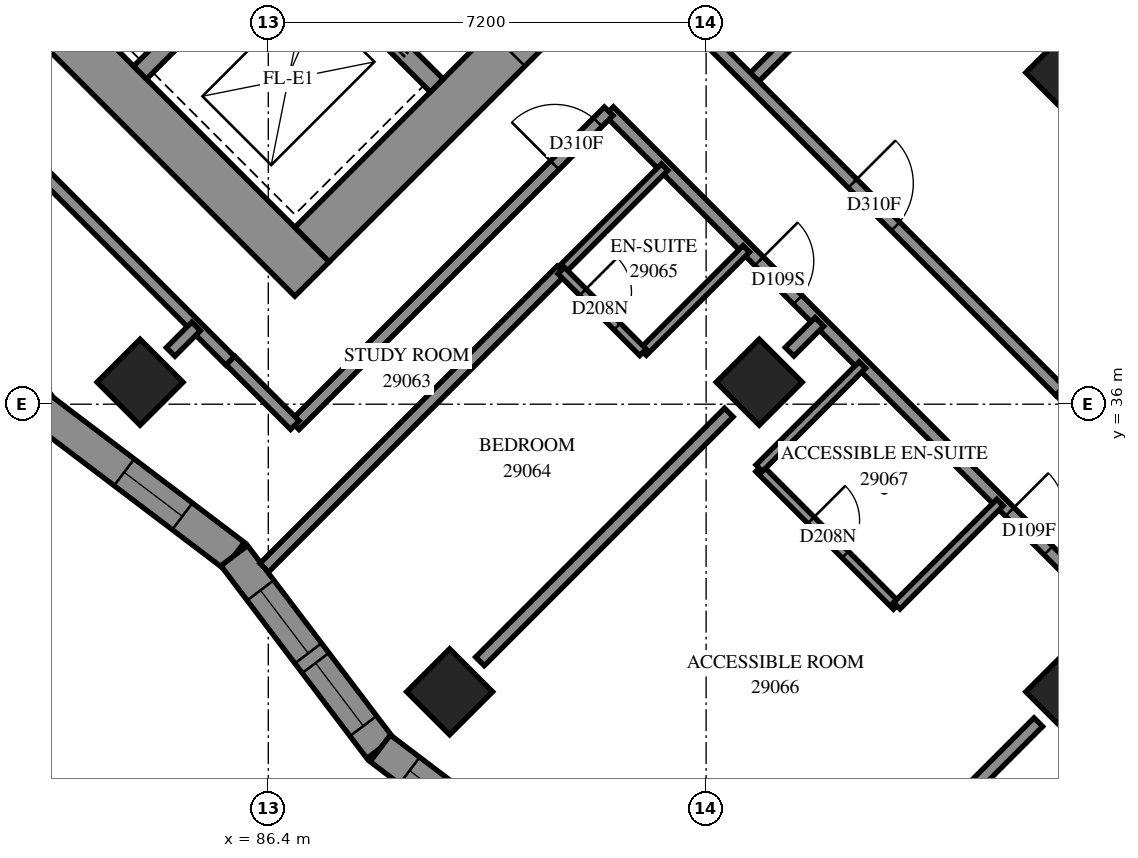
"""IFC4 building model, lengths in metres.
Left out: names, types, materials, properties, quantities, classifications, styles, units other than length and angle.
Written with IfcOpenShell. Run it as: python <this file> out.ifc"""

import sys

from ifc_helpers import new_model, si_unit, direction, frame, frame_2d, origin, origin_2d, place, context, subcontext, project, spatial, polyline, rectangle, outline, extrude, element, fill, save


model = new_model("IFC4")
c1 = context("Model", 3, precision=1e-05, world=origin(), true_north=direction((0.0, 1.0)))
c2 = subcontext(c1, "Body", "Model", "MODEL_VIEW")
j1 = project(units=[si_unit("LENGTHUNIT", "METRE"), si_unit("PLANEANGLEUNIT", "RADIAN")], contexts=[c1])
p1 = place(None, origin())
s1 = spatial("IfcSite", under=j1, at=p1, CompositionType="ELEMENT")
p2 = place(p1, origin())
s2 = spatial("IfcBuilding", under=s1, at=p2, CompositionType="ELEMENT")
p3 = place(p2, frame((0.0, 0.0, 108.4)))
s3 = spatial("IfcBuildingStorey", under=s2, at=p3, CompositionType="ELEMENT", Elevation=108.4)
for number, where, z_axis, x_axis in (
    (1, (84.291, 36.362, 0.0), (0.0, 0.0, 1.0), (0.707, -0.707, 0.0)),
    (2, (99.565, 41.453, 0.0), (0.0, 0.0, 1.0), (0.707, -0.707, 0.0)),
    (3, (94.474, 36.362, 0.0), (0.0, 0.0, 1.0), (0.707, -0.707, 0.0)),
    (4, (89.382, 31.271, 0.0), (0.0, 0.0, 1.0), (0.707, -0.707, 0.0)),
    (5, (99.565, 31.271, 0.0), (0.0, 0.0, 1.0), (0.707, -0.707, 0.0)),
):
    element("IfcColumn", number, at=place(p3, frame(where, z_axis=z_axis, x_axis=x_axis)), inside=s3, PredefinedType="COLUMN", context=c2, shape_type="SweptSolid", body=[
        extrude(rectangle(XDim=1.0, YDim=1.0, at=origin_2d()), origin(), (0.0, 0.0, 1.0), 3.1),
    ])
p4 = place(p3, frame((75.806, 49.373, -0.3), z_axis=(0.0, 0.0, 1.0), x_axis=(0.7071067812, -0.7071067812, 0.0)))
e6 = element("IfcWall", 6, at=p4, inside=s3, PredefinedType="SHEAR", context=c2, shape_type="SweptSolid", body=[
    extrude(rectangle(XDim=16.0, YDim=0.8, at=frame_2d((8.0, 0.0))), origin(), (0.0, 0.0, 1.0), 2.7),
])
p5 = place(p3, frame((87.12, 38.625, -0.3), z_axis=(0.0, 0.0, 1.0), x_axis=(0.7071067812, 0.7071067812, 0.0)))
e7 = element("IfcWall", 7, at=p5, inside=s3, PredefinedType="SHEAR", context=c2, shape_type="SweptSolid", body=[
    extrude(rectangle(XDim=14.4, YDim=0.8, at=frame_2d((7.2, 0.0))), origin(), (0.0, 0.0, 1.0), 2.7),
])
p6 = place(p5, frame((4.55, 0.0, 0.3)))
e8 = element("IfcOpeningElement", 8, at=p6, cuts=e7, PredefinedType="OPENING", context=c2, shape_type="SweptSolid", body=[
    extrude(rectangle(XDim=1.1, YDim=2.1, at=frame_2d((0.55, 1.05))), frame((0.0, 0.41, 0.0), z_axis=(0.0, -1.0, 0.0), x_axis=(1.0, 0.0, 0.0)), (0.0, 0.0, 1.0), 0.82),
])
p7 = place(p5, frame((11.35, 0.0, 0.3)))
e9 = element("IfcOpeningElement", 9, at=p7, cuts=e7, PredefinedType="OPENING", context=c2, shape_type="SweptSolid", body=[
    extrude(rectangle(XDim=1.1, YDim=2.1, at=frame_2d((0.55, 1.05))), frame((0.0, 0.41, 0.0), z_axis=(0.0, -1.0, 0.0), x_axis=(1.0, 0.0, 0.0)), (0.0, 0.0, 1.0), 0.82),
])
p8 = place(p3, frame((84.291, 41.453, 0.0), z_axis=(0.0, 0.0, 1.0), x_axis=(0.7071067812, 0.7071067812, 0.0)))
e10 = element("IfcWall", 10, at=p8, inside=s3, PredefinedType="SOLIDWALL", context=c2, shape_type="SweptSolid", body=[
    extrude(rectangle(XDim=3.3, YDim=0.3, at=frame_2d((1.65, 0.0))), origin(), (0.0, 0.0, 1.0), 3.1),
])
p9 = place(p3, frame((78.988, 51.423, 0.0), z_axis=(0.0, 0.0, 1.0), x_axis=(0.7071067812, -0.7071067812, 0.0)))
e11 = element("IfcWall", 11, at=p9, inside=s3, PredefinedType="SOLIDWALL", context=c2, shape_type="SweptSolid", body=[
    extrude(rectangle(XDim=14.4, YDim=0.3, at=frame_2d((7.2, 0.0))), origin(), (0.0, 0.0, 1.0), 3.1),
])
p10 = place(p9, frame((1.25, 0.0, 0.0)))
e12 = element("IfcOpeningElement", 12, at=p10, cuts=e11, PredefinedType="OPENING", context=c2, shape_type="SweptSolid", body=[
    extrude(rectangle(XDim=1.1, YDim=2.1, at=frame_2d((0.55, 1.05))), frame((0.0, 0.16, 0.0), z_axis=(0.0, -1.0, 0.0), x_axis=(1.0, 0.0, 0.0)), (0.0, 0.0, 1.0), 0.32),
])
p11 = place(p9, frame((4.85, 0.0, 0.0)))
e13 = element("IfcOpeningElement", 13, at=p11, cuts=e11, PredefinedType="OPENING", context=c2, shape_type="SweptSolid", body=[
    extrude(rectangle(XDim=1.1, YDim=2.1, at=frame_2d((0.55, 1.05))), frame((0.0, 0.16, 0.0), z_axis=(0.0, -1.0, 0.0), x_axis=(1.0, 0.0, 0.0)), (0.0, 0.0, 1.0), 0.32),
])
p12 = place(p9, frame((8.45, 0.0, 0.0)))
e14 = element("IfcOpeningElement", 14, at=p12, cuts=e11, PredefinedType="OPENING", context=c2, shape_type="SweptSolid", body=[
    extrude(rectangle(XDim=1.1, YDim=2.1, at=frame_2d((0.55, 1.05))), frame((0.0, 0.16, 0.0), z_axis=(0.0, -1.0, 0.0), x_axis=(1.0, 0.0, 0.0)), (0.0, 0.0, 1.0), 0.32),
])
p13 = place(p9, frame((12.05, 0.0, 0.0)))
e15 = element("IfcOpeningElement", 15, at=p13, cuts=e11, PredefinedType="OPENING", context=c2, shape_type="SweptSolid", body=[
    extrude(rectangle(XDim=1.1, YDim=2.1, at=frame_2d((0.55, 1.05))), frame((0.0, 0.16, 0.0), z_axis=(0.0, -1.0, 0.0), x_axis=(1.0, 0.0, 0.0)), (0.0, 0.0, 1.0), 0.32),
])
p14 = place(p3, frame((80.258, 39.094, 0.0), z_axis=(0.0, 0.0, 1.0), x_axis=(0.6040769252, -0.7969260119, 0.0)))
e16 = element("IfcWall", 16, at=p14, inside=s3, PredefinedType="SOLIDWALL", context=c2, shape_type="SweptSolid", body=[
    extrude(outline(polyline([(0.059, -0.275), (4.033, -0.275), (3.958, 0.275), (-0.059, 0.275), (0.059, -0.275)])), origin(), (0.0, 0.0, 1.0), 3.1),
])
p15 = place(p14, frame((1.876, 0.0, 0.5)))
e17 = element("IfcOpeningElement", 17, at=p15, cuts=e16, PredefinedType="OPENING", context=c2, shape_type="SweptSolid", body=[
    extrude(rectangle(XDim=1.2, YDim=2.45, at=frame_2d((0.6, 1.225))), frame((0.0, 0.285, 0.0), z_axis=(0.0, -1.0, 0.0), x_axis=(1.0, 0.0, 0.0)), (0.0, 0.0, 1.0), 0.57),
])
p16 = place(p3, frame((82.672, 35.91, 0.0), z_axis=(0.0, 0.0, 1.0), x_axis=(0.7969251465, -0.6040780669, 0.0)))
e18 = element("IfcWall", 18, at=p16, inside=s3, PredefinedType="SOLIDWALL", context=c2, shape_type="SweptSolid", body=[
    extrude(outline(polyline([(-0.038, -0.275), (3.937, -0.275), (4.013, 0.275), (0.038, 0.275), (-0.038, -0.275)])), origin(), (0.0, 0.0, 1.0), 3.1),
])
p17 = place(p16, frame((1.704, 0.0, 0.5)))
e19 = element("IfcOpeningElement", 19, at=p17, cuts=e18, PredefinedType="OPENING", context=c2, shape_type="SweptSolid", body=[
    extrude(rectangle(XDim=1.2, YDim=2.45, at=frame_2d((0.6, 1.225))), frame((0.0, 0.285, 0.0), z_axis=(0.0, -1.0, 0.0), x_axis=(1.0, 0.0, 0.0)), (0.0, 0.0, 1.0), 0.57),
])
p18 = place(p3, frame((85.84, 33.509, 0.0), z_axis=(0.0, 0.0, 1.0), x_axis=(0.6040819333, -0.7969222157, 0.0)))
e20 = element("IfcWall", 20, at=p18, inside=s3, PredefinedType="SOLIDWALL", context=c2, shape_type="SweptSolid", body=[
    extrude(outline(polyline([(0.038, -0.275), (4.013, -0.275), (3.937, 0.275), (-0.038, 0.275), (0.038, -0.275)])), origin(), (0.0, 0.0, 1.0), 3.1),
])
p19 = place(p18, frame((0.715, 0.0, 0.5)))
e21 = element("IfcOpeningElement", 21, at=p19, cuts=e20, PredefinedType="OPENING", context=c2, shape_type="SweptSolid", body=[
    extrude(rectangle(XDim=1.3, YDim=2.45, at=frame_2d((0.65, 1.225))), frame((0.0, 0.285, 0.0), z_axis=(0.0, -1.0, 0.0), x_axis=(1.0, 0.0, 0.0)), (0.0, 0.0, 1.0), 0.57),
])
p20 = place(p18, frame((2.215, 0.0, 0.5)))
e22 = element("IfcOpeningElement", 22, at=p20, cuts=e20, PredefinedType="OPENING", context=c2, shape_type="SweptSolid", body=[
    extrude(rectangle(XDim=1.3, YDim=2.45, at=frame_2d((0.65, 1.225))), frame((0.0, 0.285, 0.0), z_axis=(0.0, -1.0, 0.0), x_axis=(1.0, 0.0, 0.0)), (0.0, 0.0, 1.0), 0.57),
])
p21 = place(p3, frame((88.241, 30.341, 0.0), z_axis=(0.0, 0.0, 1.0), x_axis=(0.7969251465, -0.6040780669, 0.0)))
e23 = element("IfcWall", 23, at=p21, inside=s3, PredefinedType="SOLIDWALL", context=c2, shape_type="SweptSolid", body=[
    extrude(outline(polyline([(-0.038, -0.275), (3.937, -0.275), (4.013, 0.275), (0.038, 0.275), (-0.038, -0.275)])), origin(), (0.0, 0.0, 1.0), 3.1),
])
p22 = place(p21, frame((0.606, 0.0, 0.5)))
e24 = element("IfcOpeningElement", 24, at=p22, cuts=e23, PredefinedType="OPENING", context=c2, shape_type="SweptSolid", body=[
    extrude(rectangle(XDim=1.3, YDim=2.45, at=frame_2d((0.65, 1.225))), frame((0.0, 0.285, 0.0), z_axis=(0.0, -1.0, 0.0), x_axis=(1.0, 0.0, 0.0)), (0.0, 0.0, 1.0), 0.57),
])
p23 = place(p21, frame((2.106, 0.0, 0.5)))
e25 = element("IfcOpeningElement", 25, at=p23, cuts=e23, PredefinedType="OPENING", context=c2, shape_type="SweptSolid", body=[
    extrude(rectangle(XDim=1.3, YDim=2.45, at=frame_2d((0.65, 1.225))), frame((0.0, 0.285, 0.0), z_axis=(0.0, -1.0, 0.0), x_axis=(1.0, 0.0, 0.0)), (0.0, 0.0, 1.0), 0.57),
])
p24 = place(p3, frame((92.004, 40.819, 0.0), z_axis=(0.0, 0.0, 1.0), x_axis=(0.7071067812, -0.7071067812, 0.0)))
e26 = element("IfcWall", 26, at=p24, inside=s3, PredefinedType="PARTITIONING", context=c2, shape_type="SweptSolid", body=[
    extrude(rectangle(XDim=19.298, YDim=0.2, at=frame_2d((9.649, 0.0))), origin(), (0.0, 0.0, 1.0), 3.1),
])
p25 = place(p24, frame((3.489, 0.0, 0.0)))
e27 = element("IfcOpeningElement", 27, at=p25, cuts=e26, PredefinedType="OPENING", context=c2, shape_type="SweptSolid", body=[
    extrude(rectangle(XDim=0.9, YDim=2.1, at=frame_2d((0.45, 1.05))), frame((0.0, 0.11, 0.0), z_axis=(0.0, -1.0, 0.0), x_axis=(1.0, 0.0, 0.0)), (0.0, 0.0, 1.0), 0.22),
])
p26 = place(p24, frame((9.319, 0.0, 0.0)))
e28 = element("IfcOpeningElement", 28, at=p26, cuts=e26, PredefinedType="OPENING", context=c2, shape_type="SweptSolid", body=[
    extrude(rectangle(XDim=0.9, YDim=2.1, at=frame_2d((0.45, 1.05))), frame((0.0, 0.11, 0.0), z_axis=(0.0, -1.0, 0.0), x_axis=(1.0, 0.0, 0.0)), (0.0, 0.0, 1.0), 0.22),
])
p27 = place(p24, frame((15.961, 0.0, 0.0)))
e29 = element("IfcOpeningElement", 29, at=p27, cuts=e26, PredefinedType="OPENING", context=c2, shape_type="SweptSolid", body=[
    extrude(rectangle(XDim=0.9, YDim=2.1, at=frame_2d((0.45, 1.05))), frame((0.0, 0.11, 0.0), z_axis=(0.0, -1.0, 0.0), x_axis=(1.0, 0.0, 0.0)), (0.0, 0.0, 1.0), 0.22),
])
p28 = place(p3, frame((99.423, 36.221, 0.0), z_axis=(0.0, 0.0, 1.0), x_axis=(0.7071067812, 0.7071067812, 0.0)))
e30 = element("IfcWall", 30, at=p28, inside=s3, PredefinedType="PARTITIONING", context=c2, shape_type="SweptSolid", body=[
    extrude(rectangle(XDim=12.125, YDim=0.2, at=frame_2d((6.062, 0.0))), origin(), (0.0, 0.0, 1.0), 3.1),
])
p29 = place(p3, frame((94.331, 41.313, 0.0), z_axis=(0.0, 0.0, 1.0), x_axis=(0.7071109253, 0.7071026371, 0.0)))
e31 = element("IfcWall", 31, at=p29, inside=s3, PredefinedType="PARTITIONING", context=c2, shape_type="SweptSolid", body=[
    extrude(rectangle(XDim=12.065, YDim=0.2, at=frame_2d((6.033, 0.0))), origin(), (0.0, 0.0, 1.0), 3.1),
])
p30 = place(p3, frame((93.411, 42.227, 0.0), z_axis=(0.0, 0.0, 1.0), x_axis=(0.7071067812, -0.7071067812, 0.0)))
e32 = element("IfcWall", 32, at=p30, inside=s3, PredefinedType="PARTITIONING", context=c2, shape_type="SweptSolid", body=[
    extrude(rectangle(XDim=8.499, YDim=0.2, at=frame_2d((4.25, 0.0))), origin(), (0.0, 0.0, 1.0), 3.1),
])
p31 = place(p30, frame((3.672, 0.0, 0.0)))
e33 = element("IfcOpeningElement", 33, at=p31, cuts=e32, PredefinedType="OPENING", context=c2, shape_type="SweptSolid", body=[
    extrude(rectangle(XDim=1.0, YDim=2.1, at=frame_2d((0.5, 1.05))), frame((0.0, 0.11, 0.0), z_axis=(0.0, -1.0, 0.0), x_axis=(1.0, 0.0, 0.0)), (0.0, 0.0, 1.0), 0.22),
])
p32 = place(p3, frame((86.835, 35.655, 0.0), z_axis=(0.0, 0.0, 1.0), x_axis=(0.7071067812, 0.7071067812, 0.0)))
e34 = element("IfcWall", 34, at=p32, inside=s3, PredefinedType="PARTITIONING", context=c2, shape_type="SweptSolid", body=[
    extrude(rectangle(XDim=7.3, YDim=0.2, at=frame_2d((3.65, 0.0))), origin(), (0.0, 0.0, 1.0), 3.1),
])
p33 = place(p32, frame((6.046, 0.0, 0.0)))
e35 = element("IfcOpeningElement", 35, at=p33, cuts=e34, PredefinedType="OPENING", context=c2, shape_type="SweptSolid", body=[
    extrude(rectangle(XDim=1.0, YDim=2.1, at=frame_2d((0.5, 1.05))), frame((0.0, 0.11, 0.0), z_axis=(0.0, -1.0, 0.0), x_axis=(1.0, 0.0, 0.0)), (0.0, 0.0, 1.0), 0.22),
])
p34 = place(p3, frame((86.334, 33.312, 0.0), z_axis=(0.0, 0.0, 1.0), x_axis=(0.7069693124, 0.7072442232, 0.0)))
e36 = element("IfcWall", 36, at=p34, inside=s3, PredefinedType="PARTITIONING", context=c2, shape_type="SweptSolid", body=[
    extrude(rectangle(XDim=6.911, YDim=0.2, at=frame_2d((3.456, 0.0))), origin(), (0.0, 0.0, 1.0), 3.1),
])
p35 = place(p3, frame((80.948, 41.536, 0.0), z_axis=(0.0, 0.0, 1.0), x_axis=(0.7071067812, -0.7071067812, 0.0)))
e37 = element("IfcWall", 37, at=p35, inside=s3, PredefinedType="PARTITIONING", context=c2, shape_type="SweptSolid", body=[
    extrude(rectangle(XDim=6.822, YDim=0.2, at=frame_2d((3.411, 0.0))), origin(), (0.0, 0.0, 1.0), 3.1),
])
p36 = place(p3, frame((89.881, 31.771, 0.0), z_axis=(0.0, 0.0, 1.0), x_axis=(0.7071067812, 0.7071067812, 0.0)))
e38 = element("IfcWall", 38, at=p36, inside=s3, PredefinedType="PARTITIONING", context=c2, shape_type="SweptSolid", body=[
    extrude(rectangle(XDim=5.787, YDim=0.2, at=frame_2d((2.893, 0.0))), origin(), (0.0, 0.0, 1.0), 3.1),
])
p37 = place(p3, frame((94.973, 26.681, 0.0), z_axis=(0.0, 0.0, 1.0), x_axis=(0.7071067812, 0.7071067812, 0.0)))
e39 = element("IfcWall", 39, at=p37, inside=s3, PredefinedType="PARTITIONING", context=c2, shape_type="SweptSolid", body=[
    extrude(rectangle(XDim=5.784, YDim=0.2, at=frame_2d((2.892, 0.0))), origin(), (0.0, 0.0, 1.0), 3.1),
])
p38 = place(p3, frame((103.168, 32.47, 0.0), z_axis=(0.0, 0.0, 1.0), x_axis=(-0.7067858967, 0.7074275201, 0.0)))
e40 = element("IfcWall", 40, at=p38, inside=s3, PredefinedType="PARTITIONING", context=c2, shape_type="SweptSolid", body=[
    extrude(rectangle(XDim=5.299, YDim=0.2, at=frame_2d((2.65, 0.0))), origin(), (0.0, 0.0, 1.0), 3.1),
])
p39 = place(p38, frame((2.043, 0.0, 0.0)))
e41 = element("IfcOpeningElement", 41, at=p39, cuts=e40, PredefinedType="OPENING", context=c2, shape_type="SweptSolid", body=[
    extrude(rectangle(XDim=0.9, YDim=2.1, at=frame_2d((0.45, 1.05))), frame((0.0, 0.11, 0.0), z_axis=(0.0, -1.0, 0.0), x_axis=(1.0, 0.0, 0.0)), (0.0, 0.0, 1.0), 0.22),
])
p40 = place(p3, frame((94.471, 34.945, 0.0), z_axis=(0.0, 0.0, 1.0), x_axis=(0.7067942478, -0.7074191764, 0.0)))
e42 = element("IfcWall", 42, at=p40, inside=s3, PredefinedType="PARTITIONING", context=c2, shape_type="SweptSolid", body=[
    extrude(rectangle(XDim=3.2, YDim=0.15, at=frame_2d((1.6, 0.0))), origin(), (0.0, 0.0, 1.0), 3.1),
])
p41 = place(p40, frame((1.206, 0.0, 0.0)))
e43 = element("IfcOpeningElement", 43, at=p41, cuts=e42, PredefinedType="OPENING", context=c2, shape_type="SweptSolid", body=[
    extrude(rectangle(XDim=0.8, YDim=2.1, at=frame_2d((0.4, 1.05))), frame((0.0, 0.085, 0.0), z_axis=(0.0, -1.0, 0.0), x_axis=(1.0, 0.0, 0.0)), (0.0, 0.0, 1.0), 0.17),
])
for number, where, z_axis, x_axis in (
    (44, (92.563, 36.857, 0.0), (0.0, 0.0, 1.0), (0.707, 0.707, 0.0)),
    (45, (91.219, 38.201, 0.0), (0.0, 0.0, 1.0), (0.707, 0.707, 0.0)),
    (46, (96.735, 32.685, 0.0), (0.0, 0.0, 1.0), (0.707, 0.707, 0.0)),
):
    element("IfcWall", number, at=place(p3, frame(where, z_axis=z_axis, x_axis=x_axis)), inside=s3, PredefinedType="PARTITIONING", context=c2, shape_type="SweptSolid", body=[
        extrude(rectangle(XDim=2.401, YDim=0.15, at=frame_2d((1.201, 0.0))), origin(), (0.0, 0.0, 1.0), 3.1),
    ])
p42 = place(p3, frame((94.473, 34.949, 0.0), z_axis=(0.0, 0.0, 1.0), x_axis=(0.7071067812, 0.7071067812, 0.0)))
e47 = element("IfcWall", 47, at=p42, inside=s3, PredefinedType="PARTITIONING", context=c2, shape_type="SweptSolid", body=[
    extrude(rectangle(XDim=2.398, YDim=0.15, at=frame_2d((1.199, 0.0))), origin(), (0.0, 0.0, 1.0), 3.1),
])
p43 = place(p3, frame((91.217, 38.197, 0.0), z_axis=(0.0, 0.0, 1.0), x_axis=(0.7071067812, -0.7071067812, 0.0)))
e48 = element("IfcWall", 48, at=p43, inside=s3, PredefinedType="PARTITIONING", context=c2, shape_type="SweptSolid", body=[
    extrude(rectangle(XDim=1.901, YDim=0.15, at=frame_2d((0.95, 0.0))), origin(), (0.0, 0.0, 1.0), 3.1),
])
p44 = place(p43, frame((0.502, 0.0, 0.0)))
e49 = element("IfcOpeningElement", 49, at=p44, cuts=e48, PredefinedType="OPENING", context=c2, shape_type="SweptSolid", body=[
    extrude(rectangle(XDim=0.8, YDim=2.1, at=frame_2d((0.4, 1.05))), frame((0.0, 0.085, 0.0), z_axis=(0.0, -1.0, 0.0), x_axis=(1.0, 0.0, 0.0)), (0.0, 0.0, 1.0), 0.17),
])
p45 = place(p3, frame((85.778, 36.718, 0.0), z_axis=(0.0, 0.0, 1.0), x_axis=(0.7064400143, -0.70777292, 0.0)))
e50 = element("IfcWall", 50, at=p45, inside=s3, PredefinedType="PARTITIONING", context=c2, shape_type="SweptSolid", body=[
    extrude(rectangle(XDim=1.5, YDim=0.2, at=frame_2d((0.75, 0.0))), origin(), (0.0, 0.0, 1.0), 3.1),
])
p46 = place(p3, frame((94.973, 36.863, 0.0), z_axis=(0.0, 0.0, 1.0), x_axis=(0.7071067812, 0.7071067812, 0.0)))
e51 = element("IfcWall", 51, at=p46, inside=s3, PredefinedType="PARTITIONING", context=c2, shape_type="SweptSolid", body=[
    extrude(rectangle(XDim=0.693, YDim=0.2, at=frame_2d((0.346, 0.0))), origin(), (0.0, 0.0, 1.0), 3.1),
])
p47 = place(p3, frame((84.794, 36.86, 0.0), z_axis=(0.0, 0.0, 1.0), x_axis=(0.7054171665, 0.7087923682, 0.0)))
e52 = element("IfcWall", 52, at=p47, inside=s3, PredefinedType="PARTITIONING", context=c2, shape_type="SweptSolid", body=[
    extrude(rectangle(XDim=0.593, YDim=0.2, at=frame_2d((0.296, 0.0))), origin(), (0.0, 0.0, 1.0), 3.1),
])
p48 = place(p17, origin())
e53 = element("IfcWindow", 53, at=p48, inside=s3, PartitioningType="SINGLE_PANEL", PredefinedType="WINDOW", context=c2, shape_type="SweptSolid", body=[
    extrude(rectangle(XDim=1.2, YDim=2.45, at=frame_2d((0.6, 1.225))), frame((0.0, 0.155, 0.0), z_axis=(0.0, -1.0, 0.0), x_axis=(1.0, 0.0, 0.0)), (0.0, 0.0, 1.0), 0.06),
])
fill(e19, e53)
p49 = place(p19, origin())
e54 = element("IfcWindow", 54, at=p49, inside=s3, PartitioningType="SINGLE_PANEL", PredefinedType="WINDOW", context=c2, shape_type="SweptSolid", body=[
    extrude(rectangle(XDim=1.3, YDim=2.45, at=frame_2d((0.65, 1.225))), frame((0.0, 0.155, 0.0), z_axis=(0.0, -1.0, 0.0), x_axis=(1.0, 0.0, 0.0)), (0.0, 0.0, 1.0), 0.06),
])
fill(e21, e54)
p50 = place(p20, origin())
e55 = element("IfcWindow", 55, at=p50, inside=s3, PartitioningType="SINGLE_PANEL", PredefinedType="WINDOW", context=c2, shape_type="SweptSolid", body=[
    extrude(rectangle(XDim=1.3, YDim=2.45, at=frame_2d((0.65, 1.225))), frame((0.0, 0.155, 0.0), z_axis=(0.0, -1.0, 0.0), x_axis=(1.0, 0.0, 0.0)), (0.0, 0.0, 1.0), 0.06),
])
fill(e22, e55)
p51 = place(p22, origin())
e56 = element("IfcWindow", 56, at=p51, inside=s3, PartitioningType="SINGLE_PANEL", PredefinedType="WINDOW", context=c2, shape_type="SweptSolid", body=[
    extrude(rectangle(XDim=1.3, YDim=2.45, at=frame_2d((0.65, 1.225))), frame((0.0, 0.155, 0.0), z_axis=(0.0, -1.0, 0.0), x_axis=(1.0, 0.0, 0.0)), (0.0, 0.0, 1.0), 0.06),
])
fill(e24, e56)
p52 = place(p31, origin())
e57 = element("IfcDoor", 57, at=p52, inside=s3, OperationType="SINGLE_SWING_RIGHT", PredefinedType="DOOR", context=c2, shape_type="SweptSolid", body=[
    extrude(rectangle(XDim=1.0, YDim=2.1, at=frame_2d((0.5, 1.05))), frame((0.0, 0.025, 0.0), z_axis=(0.0, -1.0, 0.0), x_axis=(1.0, 0.0, 0.0)), (0.0, 0.0, 1.0), 0.05),
])
fill(e33, e57)
p53 = place(p33, origin())
e58 = element("IfcDoor", 58, at=p53, inside=s3, OperationType="SINGLE_SWING_RIGHT", PredefinedType="DOOR", context=c2, shape_type="SweptSolid", body=[
    extrude(rectangle(XDim=1.0, YDim=2.1, at=frame_2d((0.5, 1.05))), frame((0.0, 0.025, 0.0), z_axis=(0.0, -1.0, 0.0), x_axis=(1.0, 0.0, 0.0)), (0.0, 0.0, 1.0), 0.05),
])
fill(e35, e58)
p54 = place(p25, origin())
e59 = element("IfcDoor", 59, at=p54, inside=s3, OperationType="SINGLE_SWING_LEFT", PredefinedType="DOOR", context=c2, shape_type="SweptSolid", body=[
    extrude(rectangle(XDim=0.9, YDim=2.1, at=frame_2d((0.45, 1.05))), frame((0.0, 0.025, 0.0), z_axis=(0.0, -1.0, 0.0), x_axis=(1.0, 0.0, 0.0)), (0.0, 0.0, 1.0), 0.05),
])
fill(e27, e59)
p55 = place(p44, origin())
e60 = element("IfcDoor", 60, at=p55, inside=s3, OperationType="SINGLE_SWING_RIGHT", PredefinedType="DOOR", context=c2, shape_type="SweptSolid", body=[
    extrude(rectangle(XDim=0.8, YDim=2.1, at=frame_2d((0.4, 1.05))), frame((0.0, 0.025, 0.0), z_axis=(0.0, -1.0, 0.0), x_axis=(1.0, 0.0, 0.0)), (0.0, 0.0, 1.0), 0.05),
])
fill(e49, e60)
p56 = place(p26, origin())
e61 = element("IfcDoor", 61, at=p56, inside=s3, OperationType="SINGLE_SWING_RIGHT", PredefinedType="DOOR", context=c2, shape_type="SweptSolid", body=[
    extrude(rectangle(XDim=0.9, YDim=2.1, at=frame_2d((0.45, 1.05))), frame((0.0, 0.025, 0.0), z_axis=(0.0, -1.0, 0.0), x_axis=(1.0, 0.0, 0.0)), (0.0, 0.0, 1.0), 0.05),
])
fill(e28, e61)
p57 = place(p41, origin())
e62 = element("IfcDoor", 62, at=p57, inside=s3, OperationType="SINGLE_SWING_RIGHT", PredefinedType="DOOR", context=c2, shape_type="SweptSolid", body=[
    extrude(rectangle(XDim=0.8, YDim=2.1, at=frame_2d((0.4, 1.05))), frame((0.0, 0.025, 0.0), z_axis=(0.0, -1.0, 0.0), x_axis=(1.0, 0.0, 0.0)), (0.0, 0.0, 1.0), 0.05),
])
fill(e43, e62)
save(model, sys.argv[1])
